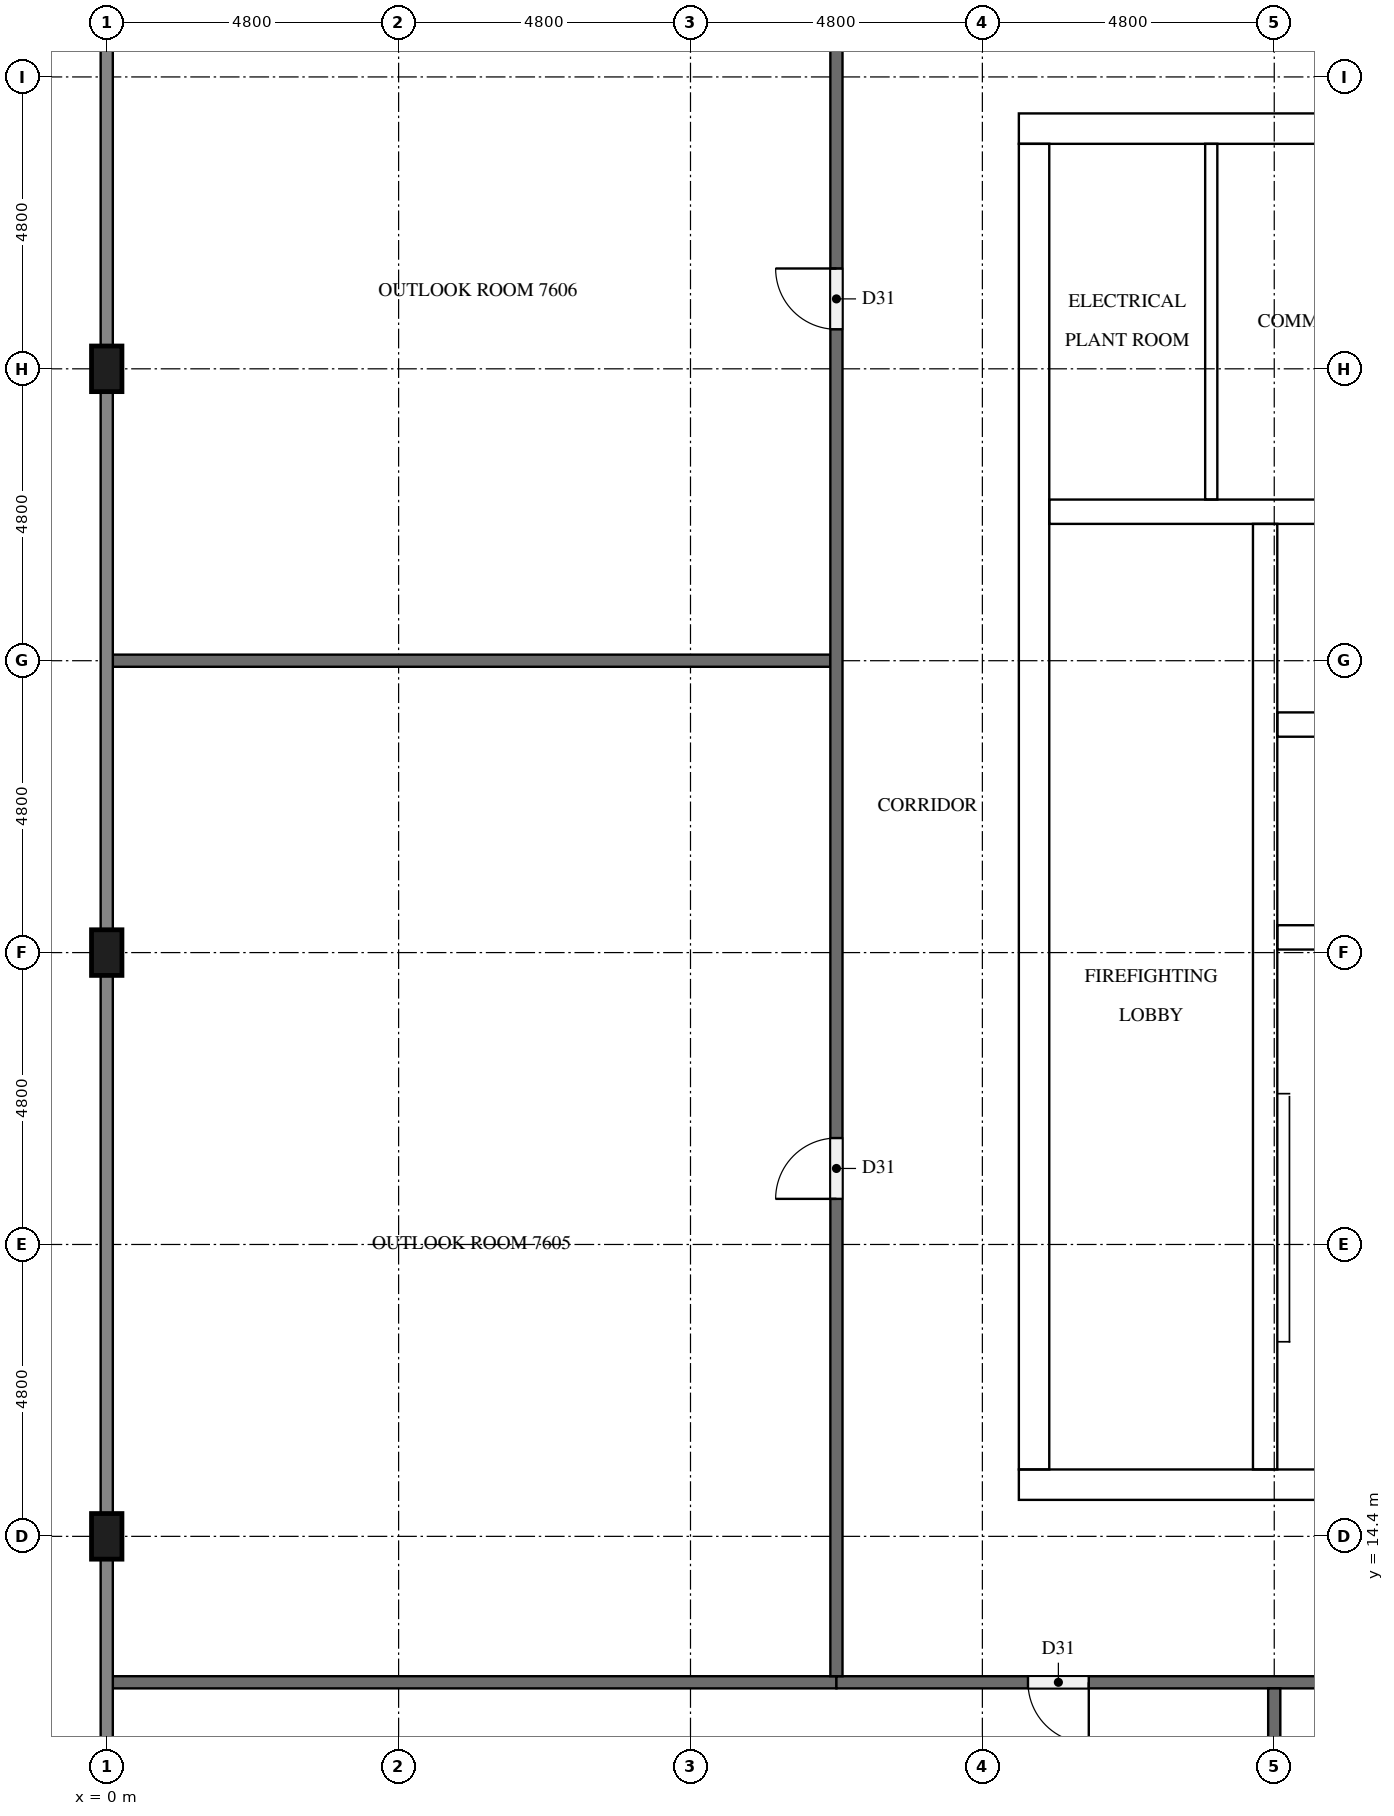
"""IFC4 building model, lengths in metres.
Left out: names, types, materials, properties, quantities, classifications, styles, units other than length and angle.
Written with IfcOpenShell. Run it as: python <this file> out.ifc"""

import sys

from ifc_helpers import new_model, si_unit, direction, frame, frame_2d, origin, origin_2d, place, context, subcontext, project, spatial, rectangle, extrude, element, fill, save


model = new_model("IFC4")
c1 = context("Model", 3, precision=1e-05, world=origin(), true_north=direction((0.0, 1.0)))
c2 = subcontext(c1, "Body", "Model", "MODEL_VIEW")
j1 = project(units=[si_unit("LENGTHUNIT", "METRE"), si_unit("PLANEANGLEUNIT", "RADIAN")], contexts=[c1])
p1 = place(None, origin())
s1 = spatial("IfcSite", under=j1, at=p1, CompositionType="ELEMENT")
p2 = place(p1, origin())
s2 = spatial("IfcBuilding", under=s1, at=p2, CompositionType="ELEMENT")
p3 = place(p2, frame((0.0, 0.0, 291.5)))
s3 = spatial("IfcBuildingStorey", under=s2, at=p3, CompositionType="ELEMENT", Elevation=291.5)
p4 = place(p3, frame((15.0, 15.25, 0.0), z_axis=(0.0, 0.0, 1.0), x_axis=(1.0, 0.0, 0.0)))
e1 = element("IfcWall", 1, at=p4, inside=s3, PredefinedType="SHEAR", context=c2, shape_type="SweptSolid", body=[
    extrude(rectangle(XDim=32.4, YDim=0.5, at=frame_2d((16.2, 0.0))), origin(), (0.0, 0.0, 1.0), 4.4),
])
p5 = place(p4, frame((15.3, 0.0, 0.0)))
e2 = element("IfcOpeningElement", 2, at=p5, cuts=e1, PredefinedType="OPENING", context=c2, shape_type="SweptSolid", body=[
    extrude(rectangle(XDim=1.8, YDim=2.1, at=frame_2d((0.9, 1.05))), frame((0.0, 0.26, 0.0), z_axis=(0.0, -1.0, 0.0), x_axis=(1.0, 0.0, 0.0)), (0.0, 0.0, 1.0), 0.52),
])
p6 = place(p3, frame((15.0, 37.55, 0.0), z_axis=(0.0, 0.0, 1.0), x_axis=(1.0, 0.0, 0.0)))
e3 = element("IfcWall", 3, at=p6, inside=s3, PredefinedType="SHEAR", context=c2, shape_type="SweptSolid", body=[
    extrude(rectangle(XDim=32.4, YDim=0.5, at=frame_2d((16.2, 0.0))), origin(), (0.0, 0.0, 1.0), 4.4),
])
p7 = place(p6, frame((15.3, 0.0, 0.0)))
e4 = element("IfcOpeningElement", 4, at=p7, cuts=e3, PredefinedType="OPENING", context=c2, shape_type="SweptSolid", body=[
    extrude(rectangle(XDim=1.8, YDim=2.1, at=frame_2d((0.9, 1.05))), frame((0.0, 0.26, 0.0), z_axis=(0.0, -1.0, 0.0), x_axis=(1.0, 0.0, 0.0)), (0.0, 0.0, 1.0), 0.52),
])
p8 = place(p6, frame((1.282, 0.0, 0.0)))
e5 = element("IfcOpeningElement", 5, at=p8, cuts=e3, PredefinedType="OPENING", context=c2, shape_type="SweptSolid", body=[
    extrude(rectangle(XDim=1.0, YDim=2.1, at=frame_2d((0.5, 1.05))), frame((0.0, 0.26, 0.0), z_axis=(0.0, -1.0, 0.0), x_axis=(1.0, 0.0, 0.0)), (0.0, 0.0, 1.0), 0.52),
])
p9 = place(p6, frame((5.082, 0.0, 0.0)))
e6 = element("IfcOpeningElement", 6, at=p9, cuts=e3, PredefinedType="OPENING", context=c2, shape_type="SweptSolid", body=[
    extrude(rectangle(XDim=1.0, YDim=2.1, at=frame_2d((0.5, 1.05))), frame((0.0, 0.26, 0.0), z_axis=(0.0, -1.0, 0.0), x_axis=(1.0, 0.0, 0.0)), (0.0, 0.0, 1.0), 0.52),
])
p10 = place(p3, frame((15.25, 15.5, 0.0), z_axis=(0.0, 0.0, 1.0), x_axis=(0.0, 1.0, 0.0)))
e7 = element("IfcWall", 7, at=p10, inside=s3, PredefinedType="SHEAR", context=c2, shape_type="SweptSolid", body=[
    extrude(rectangle(XDim=21.8, YDim=0.5, at=frame_2d((10.9, 0.0))), origin(), (0.0, 0.0, 1.0), 4.4),
])
p11 = place(p10, frame((5.26, 0.0, 0.0)))
e8 = element("IfcOpeningElement", 8, at=p11, cuts=e7, PredefinedType="OPENING", context=c2, shape_type="SweptSolid", body=[
    extrude(rectangle(XDim=1.2, YDim=2.1, at=frame_2d((0.6, 1.05))), frame((0.0, 0.26, 0.0), z_axis=(0.0, -1.0, 0.0), x_axis=(1.0, 0.0, 0.0)), (0.0, 0.0, 1.0), 0.52),
])
p12 = place(p3, frame((19.05, 15.5, 0.0), z_axis=(0.0, 0.0, 1.0), x_axis=(0.0, 1.0, 0.0)))
e9 = element("IfcWall", 9, at=p12, inside=s3, PredefinedType="SHEAR", context=c2, shape_type="SweptSolid", body=[
    extrude(rectangle(XDim=15.55, YDim=0.4, at=frame_2d((7.775, 0.0))), origin(), (0.0, 0.0, 1.0), 4.4),
])
p13 = place(p12, frame((9.95, 0.0, 0.0)))
e10 = element("IfcOpeningElement", 10, at=p13, cuts=e9, PredefinedType="OPENING", context=c2, shape_type="SweptSolid", body=[
    extrude(rectangle(XDim=1.1, YDim=2.1, at=frame_2d((0.55, 1.05))), frame((0.0, 0.21, 0.0), z_axis=(0.0, -1.0, 0.0), x_axis=(1.0, 0.0, 0.0)), (0.0, 0.0, 1.0), 0.42),
])
p14 = place(p12, frame((13.45, 0.0, 0.0)))
e11 = element("IfcOpeningElement", 11, at=p14, cuts=e9, PredefinedType="OPENING", context=c2, shape_type="SweptSolid", body=[
    extrude(rectangle(XDim=1.1, YDim=2.1, at=frame_2d((0.55, 1.05))), frame((0.0, 0.21, 0.0), z_axis=(0.0, -1.0, 0.0), x_axis=(1.0, 0.0, 0.0)), (0.0, 0.0, 1.0), 0.42),
])
p15 = place(p12, frame((0.7, 0.0, 0.0)))
e12 = element("IfcOpeningElement", 12, at=p15, cuts=e9, PredefinedType="OPENING", context=c2, shape_type="SweptSolid", body=[
    extrude(rectangle(XDim=1.2, YDim=2.1, at=frame_2d((0.6, 1.05))), frame((0.0, 0.21, 0.0), z_axis=(0.0, -1.0, 0.0), x_axis=(1.0, 0.0, 0.0)), (0.0, 0.0, 1.0), 0.42),
])
for number, where, z_axis, x_axis in (
    (13, (19.25, 24.25, 0.0), (0.0, 0.0, 1.0), (1.0, 0.0, 0.0)),
    (14, (19.25, 27.75, 0.0), (0.0, 0.0, 1.0), (1.0, 0.0, 0.0)),
):
    element("IfcWall", number, at=place(p3, frame(where, z_axis=z_axis, x_axis=x_axis)), inside=s3, PredefinedType="SHEAR", context=c2, shape_type="SweptSolid", body=[
        extrude(rectangle(XDim=3.65, YDim=0.4, at=frame_2d((1.825, 0.0))), origin(), (0.0, 0.0, 1.0), 4.4),
    ])
p16 = place(p3, frame((15.5, 31.25, 0.0), z_axis=(0.0, 0.0, 1.0), x_axis=(1.0, 0.0, 0.0)))
e15 = element("IfcWall", 15, at=p16, inside=s3, PredefinedType="SHEAR", context=c2, shape_type="SweptSolid", body=[
    extrude(rectangle(XDim=7.4, YDim=0.4, at=frame_2d((3.7, 0.0))), origin(), (0.0, 0.0, 1.0), 4.4),
])
for number, where, z_axis, x_axis in (
    (16, (0.0, 33.6, 0.0), (0.0, 0.0, 1.0), (0.0, 1.0, 0.0)),
    (17, (0.0, 24.0, 0.0), (0.0, 0.0, 1.0), (0.0, 1.0, 0.0)),
    (18, (0.0, 14.4, 0.0), (0.0, 0.0, 1.0), (0.0, 1.0, 0.0)),
):
    element("IfcColumn", number, at=place(p3, frame(where, z_axis=z_axis, x_axis=x_axis)), inside=s3, PredefinedType="COLUMN", context=c2, shape_type="SweptSolid", body=[
        extrude(rectangle(XDim=0.75, YDim=0.5, at=origin_2d()), origin(), (0.0, 0.0, 1.0), 4.4),
    ])
p17 = place(p3, frame((18.164, 31.45, 0.0), z_axis=(0.0, 0.0, 1.0), x_axis=(0.0, 1.0, 0.0)))
e19 = element("IfcWall", 19, at=p17, inside=s3, PredefinedType="PARTITIONING", context=c2, shape_type="SweptSolid", body=[
    extrude(rectangle(XDim=5.85, YDim=0.2, at=frame_2d((2.925, 0.0))), origin(), (0.0, 0.0, 1.0), 4.4),
])
p18 = place(p3, frame((0.1, 12.0, 0.0), z_axis=(0.0, 0.0, 1.0), x_axis=(1.0, 0.0, 0.0)))
e20 = element("IfcWall", 20, at=p18, inside=s3, PredefinedType="PARTITIONING", context=c2, shape_type="SweptSolid", body=[
    extrude(rectangle(XDim=11.9, YDim=0.2, at=frame_2d((5.95, 0.0))), origin(), (0.0, 0.0, 1.0), 4.4),
])
p19 = place(p3, frame((28.8, 12.0, 0.0), z_axis=(0.0, 0.0, 1.0), x_axis=(-1.0, 0.0, 0.0)))
e21 = element("IfcWall", 21, at=p19, inside=s3, PredefinedType="PARTITIONING", context=c2, shape_type="SweptSolid", body=[
    extrude(rectangle(XDim=16.8, YDim=0.2, at=frame_2d((8.4, 0.0))), origin(), (0.0, 0.0, 1.0), 4.4),
])
p20 = place(p19, frame((12.65, 0.0, 0.0)))
e22 = element("IfcOpeningElement", 22, at=p20, cuts=e21, PredefinedType="OPENING", context=c2, shape_type="SweptSolid", body=[
    extrude(rectangle(XDim=1.0, YDim=2.1, at=frame_2d((0.5, 1.05))), frame((0.0, 0.11, 0.0), z_axis=(0.0, -1.0, 0.0), x_axis=(1.0, 0.0, 0.0)), (0.0, 0.0, 1.0), 0.22),
])
p21 = place(p19, frame((4.35, 0.0, 0.0)))
e23 = element("IfcOpeningElement", 23, at=p21, cuts=e21, PredefinedType="OPENING", context=c2, shape_type="SweptSolid", body=[
    extrude(rectangle(XDim=1.0, YDim=2.1, at=frame_2d((0.5, 1.05))), frame((0.0, 0.11, 0.0), z_axis=(0.0, -1.0, 0.0), x_axis=(1.0, 0.0, 0.0)), (0.0, 0.0, 1.0), 0.22),
])
p22 = place(p3, frame((0.1, 28.8, 0.0), z_axis=(0.0, 0.0, 1.0), x_axis=(1.0, 0.0, 0.0)))
e24 = element("IfcWall", 24, at=p22, inside=s3, PredefinedType="PARTITIONING", context=c2, shape_type="SweptSolid", body=[
    extrude(rectangle(XDim=11.8, YDim=0.2, at=frame_2d((5.9, 0.0))), origin(), (0.0, 0.0, 1.0), 4.4),
])
p23 = place(p3, frame((12.0, 12.1, 0.0), z_axis=(0.0, 0.0, 1.0), x_axis=(0.0, 1.0, 0.0)))
e25 = element("IfcWall", 25, at=p23, inside=s3, PredefinedType="PARTITIONING", context=c2, shape_type="SweptSolid", body=[
    extrude(rectangle(XDim=28.6, YDim=0.2, at=frame_2d((14.3, 0.0))), origin(), (0.0, 0.0, 1.0), 4.4),
])
p24 = place(p23, frame((7.85, 0.0, 0.0)))
e26 = element("IfcOpeningElement", 26, at=p24, cuts=e25, PredefinedType="OPENING", context=c2, shape_type="SweptSolid", body=[
    extrude(rectangle(XDim=1.0, YDim=2.1, at=frame_2d((0.5, 1.05))), frame((0.0, 0.11, 0.0), z_axis=(0.0, -1.0, 0.0), x_axis=(1.0, 0.0, 0.0)), (0.0, 0.0, 1.0), 0.22),
])
p25 = place(p23, frame((22.15, 0.0, 0.0)))
e27 = element("IfcOpeningElement", 27, at=p25, cuts=e25, PredefinedType="OPENING", context=c2, shape_type="SweptSolid", body=[
    extrude(rectangle(XDim=1.0, YDim=2.1, at=frame_2d((0.5, 1.05))), frame((0.0, 0.11, 0.0), z_axis=(0.0, -1.0, 0.0), x_axis=(1.0, 0.0, 0.0)), (0.0, 0.0, 1.0), 0.22),
])
p26 = place(p3, frame((19.2, 0.1, 0.0), z_axis=(0.0, 0.0, 1.0), x_axis=(0.0, 1.0, 0.0)))
e28 = element("IfcWall", 28, at=p26, inside=s3, PredefinedType="PARTITIONING", context=c2, shape_type="SweptSolid", body=[
    extrude(rectangle(XDim=11.8, YDim=0.2, at=frame_2d((5.9, 0.0))), origin(), (0.0, 0.0, 1.0), 4.4),
])
p27 = place(p13, origin())
e29 = element("IfcDoor", 29, at=p27, inside=s3, OperationType="DOUBLE_DOOR_SLIDING", PredefinedType="DOOR", context=c2, shape_type="SweptSolid", body=[
    extrude(rectangle(XDim=1.1, YDim=2.1, at=frame_2d((0.55, 1.05))), frame((0.0, 0.025, 0.0), z_axis=(0.0, -1.0, 0.0), x_axis=(1.0, 0.0, 0.0)), (0.0, 0.0, 1.0), 0.05),
])
fill(e10, e29)
p28 = place(p14, origin())
e30 = element("IfcDoor", 30, at=p28, inside=s3, OperationType="DOUBLE_DOOR_SLIDING", PredefinedType="DOOR", context=c2, shape_type="SweptSolid", body=[
    extrude(rectangle(XDim=1.1, YDim=2.1, at=frame_2d((0.55, 1.05))), frame((0.0, 0.025, 0.0), z_axis=(0.0, -1.0, 0.0), x_axis=(1.0, 0.0, 0.0)), (0.0, 0.0, 1.0), 0.05),
])
fill(e11, e30)
p29 = place(p15, frame((1.2, 0.0, 0.0), z_axis=(0.0, 0.0, 1.0), x_axis=(-1.0, 0.0, 0.0)))
e31 = element("IfcDoor", 31, at=p29, inside=s3, OperationType="SINGLE_SWING_RIGHT", PredefinedType="DOOR", context=c2, shape_type="SweptSolid", body=[
    extrude(rectangle(XDim=1.2, YDim=2.1, at=frame_2d((0.6, 1.05))), frame((0.0, 0.025, 0.0), z_axis=(0.0, -1.0, 0.0), x_axis=(1.0, 0.0, 0.0)), (0.0, 0.0, 1.0), 0.05),
])
fill(e12, e31)
p30 = place(p11, frame((1.2, 0.0, 0.0), z_axis=(0.0, 0.0, 1.0), x_axis=(-1.0, 0.0, 0.0)))
e32 = element("IfcDoor", 32, at=p30, inside=s3, OperationType="SINGLE_SWING_LEFT", PredefinedType="DOOR", context=c2, shape_type="SweptSolid", body=[
    extrude(rectangle(XDim=1.2, YDim=2.1, at=frame_2d((0.6, 1.05))), frame((0.0, 0.025, 0.0), z_axis=(0.0, -1.0, 0.0), x_axis=(1.0, 0.0, 0.0)), (0.0, 0.0, 1.0), 0.05),
])
fill(e8, e32)
p31 = place(p8, origin())
e33 = element("IfcDoor", 33, at=p31, inside=s3, OperationType="SINGLE_SWING_LEFT", PredefinedType="DOOR", context=c2, shape_type="SweptSolid", body=[
    extrude(rectangle(XDim=1.0, YDim=2.1, at=frame_2d((0.5, 1.05))), frame((0.0, 0.025, 0.0), z_axis=(0.0, -1.0, 0.0), x_axis=(1.0, 0.0, 0.0)), (0.0, 0.0, 1.0), 0.05),
])
fill(e5, e33)
p32 = place(p20, origin())
e34 = element("IfcDoor", 34, at=p32, inside=s3, OperationType="SINGLE_SWING_LEFT", PredefinedType="DOOR", context=c2, shape_type="SweptSolid", body=[
    extrude(rectangle(XDim=1.0, YDim=2.1, at=frame_2d((0.5, 1.05))), frame((0.0, 0.025, 0.0), z_axis=(0.0, -1.0, 0.0), x_axis=(1.0, 0.0, 0.0)), (0.0, 0.0, 1.0), 0.05),
])
fill(e22, e34)
p33 = place(p24, origin())
e35 = element("IfcDoor", 35, at=p33, inside=s3, OperationType="SINGLE_SWING_LEFT", PredefinedType="DOOR", context=c2, shape_type="SweptSolid", body=[
    extrude(rectangle(XDim=1.0, YDim=2.1, at=frame_2d((0.5, 1.05))), frame((0.0, 0.025, 0.0), z_axis=(0.0, -1.0, 0.0), x_axis=(1.0, 0.0, 0.0)), (0.0, 0.0, 1.0), 0.05),
])
fill(e26, e35)
p34 = place(p25, origin())
e36 = element("IfcDoor", 36, at=p34, inside=s3, OperationType="SINGLE_SWING_RIGHT", PredefinedType="DOOR", context=c2, shape_type="SweptSolid", body=[
    extrude(rectangle(XDim=1.0, YDim=2.1, at=frame_2d((0.5, 1.05))), frame((0.0, 0.025, 0.0), z_axis=(0.0, -1.0, 0.0), x_axis=(1.0, 0.0, 0.0)), (0.0, 0.0, 1.0), 0.05),
])
fill(e27, e36)
save(model, sys.argv[1])
